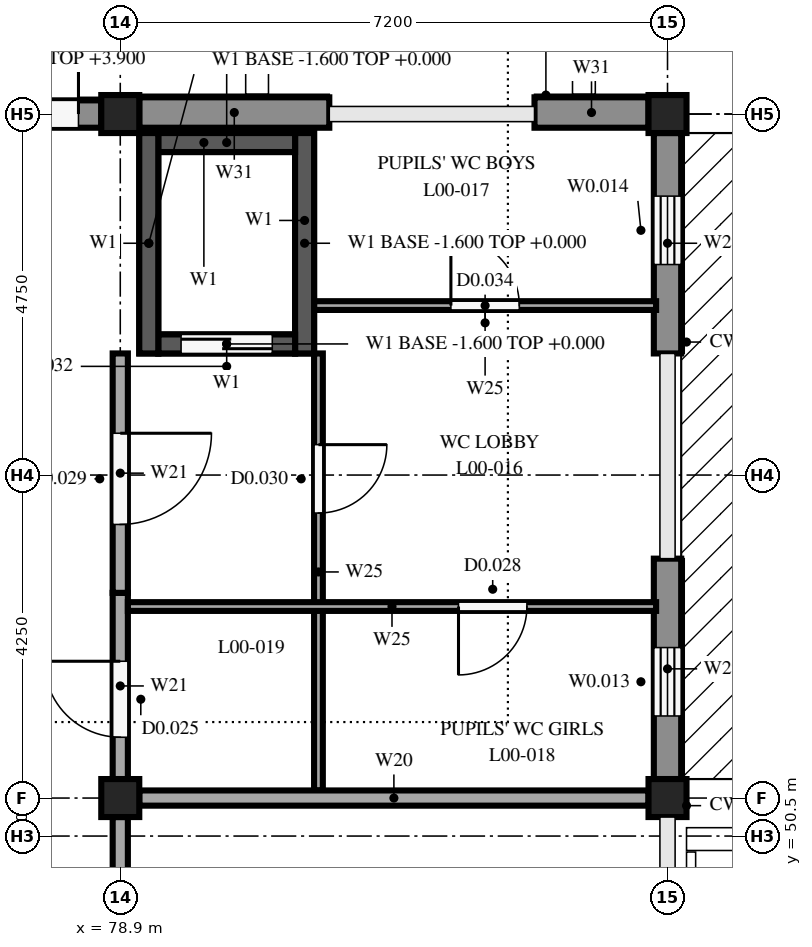
"""IFC4 building model, lengths in metres.
Left out: names, types, materials, properties, quantities, classifications, styles, units other than length and angle.
Written with IfcOpenShell. Run it as: python <this file> out.ifc"""

import sys

from ifc_helpers import new_model, si_unit, direction, frame, frame_2d, origin, origin_2d, place, context, subcontext, project, spatial, rectangle, extrude, element, fill, save


model = new_model("IFC4")
c1 = context("Model", 3, precision=1e-05, world=origin(), true_north=direction((0.0, 1.0)))
c2 = subcontext(c1, "Body", "Model", "MODEL_VIEW")
j1 = project(units=[si_unit("LENGTHUNIT", "METRE"), si_unit("PLANEANGLEUNIT", "RADIAN")], contexts=[c1])
p1 = place(None, origin())
s1 = spatial("IfcSite", under=j1, at=p1, CompositionType="ELEMENT")
p2 = place(p1, origin())
s2 = spatial("IfcBuilding", under=s1, at=p2, CompositionType="ELEMENT")
p3 = place(p2, origin())
s3 = spatial("IfcBuildingStorey", under=s2, at=p3, CompositionType="ELEMENT", Elevation=0.0)
for number, where, z_axis, x_axis in (
    (1, (78.9, 51.0, 0.0), (0.0, 0.0, 1.0), (1.0, 0.0, 0.0)),
    (2, (78.9, 60.0, 0.0), (0.0, 0.0, 1.0), (1.0, 0.0, 0.0)),
    (3, (86.1, 51.0, 0.0), (0.0, 0.0, 1.0), (1.0, 0.0, 0.0)),
    (4, (86.1, 60.0, 0.0), (0.0, 0.0, 1.0), (1.0, 0.0, 0.0)),
):
    element("IfcColumn", number, at=place(p3, frame(where, z_axis=z_axis, x_axis=x_axis)), inside=s3, PredefinedType="COLUMN", context=c2, shape_type="SweptSolid", body=[
        extrude(rectangle(XDim=0.5, YDim=0.5, at=origin_2d()), origin(), (0.0, 0.0, 1.0), 4.25),
    ])
for number, where, z_axis, x_axis in (
    (5, (79.275, 56.85, 0.0), (0.0, 0.0, 1.0), (0.0, 1.0, 0.0)),
    (6, (81.325, 56.85, 0.0), (0.0, 0.0, 1.0), (0.0, 1.0, 0.0)),
):
    element("IfcWall", number, at=place(p3, frame(where, z_axis=z_axis, x_axis=x_axis)), inside=s3, PredefinedType="SHEAR", context=c2, shape_type="SweptSolid", body=[
        extrude(rectangle(XDim=2.9, YDim=0.25, at=frame_2d((1.45, 0.0))), origin(), (0.0, 0.0, 1.0), 4.25),
    ])
p4 = place(p3, frame((79.4, 56.975, 0.0), z_axis=(0.0, 0.0, 1.0), x_axis=(1.0, 0.0, 0.0)))
e7 = element("IfcWall", 7, at=p4, inside=s3, PredefinedType="SHEAR", context=c2, shape_type="SweptSolid", body=[
    extrude(rectangle(XDim=1.8, YDim=0.25, at=frame_2d((0.9, 0.0))), origin(), (0.0, 0.0, 1.0), 4.25),
])
p5 = place(p4, frame((0.3, 0.0, 0.0)))
e8 = element("IfcOpeningElement", 8, at=p5, cuts=e7, PredefinedType="OPENING", context=c2, shape_type="SweptSolid", body=[
    extrude(rectangle(XDim=1.2, YDim=2.1, at=frame_2d((0.6, 1.05))), frame((0.0, 0.135, 0.0), z_axis=(0.0, -1.0, 0.0), x_axis=(1.0, 0.0, 0.0)), (0.0, 0.0, 1.0), 0.27),
])
p6 = place(p3, frame((79.4, 59.625, 0.0), z_axis=(0.0, 0.0, 1.0), x_axis=(1.0, 0.0, 0.0)))
e9 = element("IfcWall", 9, at=p6, inside=s3, PredefinedType="SHEAR", context=c2, shape_type="SweptSolid", body=[
    extrude(rectangle(XDim=1.8, YDim=0.25, at=frame_2d((0.9, 0.0))), origin(), (0.0, 0.0, 1.0), 4.25),
])
for number, where, z_axis, x_axis in (
    (10, (79.275, 56.85, -1.6), (0.0, 0.0, 1.0), (0.0, 1.0, 0.0)),
    (11, (81.325, 56.85, -1.6), (0.0, 0.0, 1.0), (0.0, 1.0, 0.0)),
):
    element("IfcWall", number, at=place(p3, frame(where, z_axis=z_axis, x_axis=x_axis)), inside=s3, PredefinedType="SHEAR", context=c2, shape_type="SweptSolid", body=[
        extrude(rectangle(XDim=2.9, YDim=0.25, at=frame_2d((1.45, 0.0))), origin(), (0.0, 0.0, 1.0), 1.6),
    ])
for number, where, z_axis, x_axis in (
    (12, (79.4, 56.975, -1.6), (0.0, 0.0, 1.0), (1.0, 0.0, 0.0)),
    (13, (79.4, 59.625, -1.6), (0.0, 0.0, 1.0), (1.0, 0.0, 0.0)),
):
    element("IfcWall", number, at=place(p3, frame(where, z_axis=z_axis, x_axis=x_axis)), inside=s3, PredefinedType="SHEAR", context=c2, shape_type="SweptSolid", body=[
        extrude(rectangle(XDim=1.8, YDim=0.25, at=frame_2d((0.9, 0.0))), origin(), (0.0, 0.0, 1.0), 1.6),
    ])
p7 = place(p3, frame((86.1, 54.15, 0.0), z_axis=(0.0, 0.0, 1.0), x_axis=(0.0, -1.0, 0.0)))
e14 = element("IfcWall", 14, at=p7, inside=s3, PredefinedType="STANDARD", context=c2, shape_type="SweptSolid", body=[
    extrude(rectangle(XDim=2.9, YDim=0.36, at=frame_2d((1.45, 0.0))), origin(), (0.0, 0.0, 1.0), 3.75),
])
p8 = place(p7, frame((1.17, 0.0, 1.6)))
e15 = element("IfcOpeningElement", 15, at=p8, cuts=e14, PredefinedType="OPENING", context=c2, shape_type="SweptSolid", body=[
    extrude(rectangle(XDim=0.9, YDim=1.0, at=frame_2d((0.45, 0.5))), frame((0.0, 0.19, 0.0), z_axis=(0.0, -1.0, 0.0), x_axis=(1.0, 0.0, 0.0)), (0.0, 0.0, 1.0), 0.38),
])
p9 = place(p3, frame((86.1, 59.75, 0.0), z_axis=(0.0, 0.0, 1.0), x_axis=(0.0, -1.0, 0.0)))
e16 = element("IfcWall", 16, at=p9, inside=s3, PredefinedType="STANDARD", context=c2, shape_type="SweptSolid", body=[
    extrude(rectangle(XDim=2.9, YDim=0.36, at=frame_2d((1.45, 0.0))), origin(), (0.0, 0.0, 1.0), 3.75),
])
p10 = place(p9, frame((0.83, 0.0, 1.6)))
e17 = element("IfcOpeningElement", 17, at=p10, cuts=e16, PredefinedType="OPENING", context=c2, shape_type="SweptSolid", body=[
    extrude(rectangle(XDim=0.9, YDim=1.0, at=frame_2d((0.45, 0.5))), frame((0.0, 0.19, 0.0), z_axis=(0.0, -1.0, 0.0), x_axis=(1.0, 0.0, 0.0)), (0.0, 0.0, 1.0), 0.38),
])
p11 = place(p3, frame((76.45, 60.0, 0.0), z_axis=(0.0, 0.0, 1.0), x_axis=(1.0, 0.0, 0.0)))
e18 = element("IfcWall", 18, at=p11, inside=s3, PredefinedType="STANDARD", context=c2, shape_type="SweptSolid", body=[
    extrude(rectangle(XDim=2.2, YDim=0.36, at=frame_2d((1.1, 0.0))), origin(), (0.0, 0.0, 1.0), 3.9),
])
p12 = place(p11, frame((0.3, 0.0, 0.0)))
e19 = element("IfcOpeningElement", 19, at=p12, cuts=e18, PredefinedType="OPENING", context=c2, shape_type="SweptSolid", body=[
    extrude(rectangle(XDim=1.6, YDim=2.1, at=frame_2d((0.8, 1.05))), frame((0.0, 0.19, 0.0), z_axis=(0.0, -1.0, 0.0), x_axis=(1.0, 0.0, 0.0)), (0.0, 0.0, 1.0), 0.38),
])
p13 = place(p3, frame((79.15, 60.02, 0.0), z_axis=(0.0, 0.0, 1.0), x_axis=(1.0, 0.0, 0.0)))
e20 = element("IfcWall", 20, at=p13, inside=s3, PredefinedType="STANDARD", context=c2, shape_type="SweptSolid", body=[
    extrude(rectangle(XDim=2.5, YDim=0.4, at=frame_2d((1.25, 0.0))), origin(), (0.0, 0.0, 1.0), 3.8),
])
p14 = place(p3, frame((84.35, 60.02, 0.0), z_axis=(0.0, 0.0, 1.0), x_axis=(1.0, 0.0, 0.0)))
e21 = element("IfcWall", 21, at=p14, inside=s3, PredefinedType="STANDARD", context=c2, shape_type="SweptSolid", body=[
    extrude(rectangle(XDim=1.5, YDim=0.4, at=frame_2d((0.75, 0.0))), origin(), (0.0, 0.0, 1.0), 3.8),
])
p15 = place(p3, frame((78.9, 51.25, 0.0), z_axis=(0.0, 0.0, 1.0), x_axis=(0.0, 1.0, 0.0)))
e22 = element("IfcWall", 22, at=p15, inside=s3, PredefinedType="PARTITIONING", context=c2, shape_type="SweptSolid", body=[
    extrude(rectangle(XDim=2.45, YDim=0.2, at=frame_2d((1.225, 0.0))), origin(), (0.0, 0.0, 1.0), 3.8),
])
p16 = place(p15, frame((0.55, 0.0, 0.0)))
e23 = element("IfcOpeningElement", 23, at=p16, cuts=e22, PredefinedType="OPENING", context=c2, shape_type="SweptSolid", body=[
    extrude(rectangle(XDim=1.0, YDim=2.1, at=frame_2d((0.5, 1.05))), frame((0.0, 0.11, 0.0), z_axis=(0.0, -1.0, 0.0), x_axis=(1.0, 0.0, 0.0)), (0.0, 0.0, 1.0), 0.22),
])
p17 = place(p3, frame((78.9, 56.85, 0.0), z_axis=(0.0, 0.0, 1.0), x_axis=(0.0, -1.0, 0.0)))
e24 = element("IfcWall", 24, at=p17, inside=s3, PredefinedType="PARTITIONING", context=c2, shape_type="SweptSolid", body=[
    extrude(rectangle(XDim=3.15, YDim=0.2, at=frame_2d((1.575, 0.0))), origin(), (0.0, 0.0, 1.0), 3.8),
])
p18 = place(p17, frame((1.05, 0.0, 0.0)))
e25 = element("IfcOpeningElement", 25, at=p18, cuts=e24, PredefinedType="OPENING", context=c2, shape_type="SweptSolid", body=[
    extrude(rectangle(XDim=1.2, YDim=2.1, at=frame_2d((0.6, 1.05))), frame((0.0, 0.11, 0.0), z_axis=(0.0, -1.0, 0.0), x_axis=(1.0, 0.0, 0.0)), (0.0, 0.0, 1.0), 0.22),
])
p19 = place(p3, frame((79.15, 51.0, 0.0), z_axis=(0.0, 0.0, 1.0), x_axis=(1.0, 0.0, 0.0)))
e26 = element("IfcWall", 26, at=p19, inside=s3, PredefinedType="PARTITIONING", context=c2, shape_type="SweptSolid", body=[
    extrude(rectangle(XDim=6.7, YDim=0.2, at=frame_2d((3.35, 0.0))), origin(), (0.0, 0.0, 1.0), 3.8),
])
p20 = place(p3, frame((81.508, 56.85, 0.0), z_axis=(0.0, 0.0, 1.0), x_axis=(0.0, -1.0, 0.0)))
e27 = element("IfcWall", 27, at=p20, inside=s3, PredefinedType="PARTITIONING", context=c2, shape_type="SweptSolid", body=[
    extrude(rectangle(XDim=5.75, YDim=0.115, at=frame_2d((2.875, 0.0))), origin(), (0.0, 0.0, 1.0), 4.25),
])
p21 = place(p20, frame((1.2, 0.0, 0.0)))
e28 = element("IfcOpeningElement", 28, at=p21, cuts=e27, PredefinedType="OPENING", context=c2, shape_type="SweptSolid", body=[
    extrude(rectangle(XDim=0.9, YDim=2.1, at=frame_2d((0.45, 1.05))), frame((0.0, 0.067, 0.0), z_axis=(0.0, -1.0, 0.0), x_axis=(1.0, 0.0, 0.0)), (0.0, 0.0, 1.0), 0.135),
])
p22 = place(p3, frame((81.45, 57.48, 0.0), z_axis=(0.0, 0.0, 1.0), x_axis=(1.0, 0.0, 0.0)))
e29 = element("IfcWall", 29, at=p22, inside=s3, PredefinedType="PARTITIONING", context=c2, shape_type="SweptSolid", body=[
    extrude(rectangle(XDim=4.5, YDim=0.115, at=frame_2d((2.25, 0.0))), origin(), (0.0, 0.0, 1.0), 4.25),
])
p23 = place(p22, frame((1.8, 0.0, 0.0)))
e30 = element("IfcOpeningElement", 30, at=p23, cuts=e29, PredefinedType="OPENING", context=c2, shape_type="SweptSolid", body=[
    extrude(rectangle(XDim=0.9, YDim=2.1, at=frame_2d((0.45, 1.05))), frame((0.0, 0.067, 0.0), z_axis=(0.0, -1.0, 0.0), x_axis=(1.0, 0.0, 0.0)), (0.0, 0.0, 1.0), 0.135),
])
p24 = place(p3, frame((85.95, 53.52, 0.0), z_axis=(0.0, 0.0, 1.0), x_axis=(-1.0, 0.0, 0.0)))
e31 = element("IfcWall", 31, at=p24, inside=s3, PredefinedType="PARTITIONING", context=c2, shape_type="SweptSolid", body=[
    extrude(rectangle(XDim=6.95, YDim=0.115, at=frame_2d((3.475, 0.0))), origin(), (0.0, 0.0, 1.0), 4.25),
])
p25 = place(p24, frame((1.7, 0.0, 0.0)))
e32 = element("IfcOpeningElement", 32, at=p25, cuts=e31, PredefinedType="OPENING", context=c2, shape_type="SweptSolid", body=[
    extrude(rectangle(XDim=0.9, YDim=2.1, at=frame_2d((0.45, 1.05))), frame((0.0, 0.067, 0.0), z_axis=(0.0, -1.0, 0.0), x_axis=(1.0, 0.0, 0.0)), (0.0, 0.0, 1.0), 0.135),
])
p26 = place(p3, frame((78.9, 50.75, 0.0), z_axis=(0.0, 0.0, 1.0), x_axis=(0.0, -1.0, 0.0)))
e33 = element("IfcWall", 33, at=p26, inside=s3, PredefinedType="PARTITIONING", context=c2, shape_type="SweptSolid", body=[
    extrude(rectangle(XDim=8.5, YDim=0.2, at=frame_2d((4.25, 0.0))), origin(), (0.0, 0.0, 1.0), 3.8),
])
p27 = place(p26, frame((5.85, 0.0, 0.0)))
e34 = element("IfcOpeningElement", 34, at=p27, cuts=e33, PredefinedType="OPENING", context=c2, shape_type="SweptSolid", body=[
    extrude(rectangle(XDim=1.2, YDim=2.1, at=frame_2d((0.6, 1.05))), frame((0.0, 0.11, 0.0), z_axis=(0.0, -1.0, 0.0), x_axis=(1.0, 0.0, 0.0)), (0.0, 0.0, 1.0), 0.22),
])
p28 = place(p26, frame((1.45, 0.0, 0.0)))
e35 = element("IfcOpeningElement", 35, at=p28, cuts=e33, PredefinedType="OPENING", context=c2, shape_type="SweptSolid", body=[
    extrude(rectangle(XDim=1.2, YDim=2.1, at=frame_2d((0.6, 1.05))), frame((0.0, 0.11, 0.0), z_axis=(0.0, -1.0, 0.0), x_axis=(1.0, 0.0, 0.0)), (0.0, 0.0, 1.0), 0.22),
])
p29 = place(p8, origin())
e36 = element("IfcWindow", 36, at=p29, inside=s3, PartitioningType="SINGLE_PANEL", PredefinedType="WINDOW", context=c2, shape_type="SweptSolid", body=[
    extrude(rectangle(XDim=0.9, YDim=1.0, at=frame_2d((0.45, 0.5))), frame((0.0, 0.03, 0.0), z_axis=(0.0, -1.0, 0.0), x_axis=(1.0, 0.0, 0.0)), (0.0, 0.0, 1.0), 0.06),
])
fill(e15, e36)
p30 = place(p10, origin())
e37 = element("IfcWindow", 37, at=p30, inside=s3, PartitioningType="SINGLE_PANEL", PredefinedType="WINDOW", context=c2, shape_type="SweptSolid", body=[
    extrude(rectangle(XDim=0.9, YDim=1.0, at=frame_2d((0.45, 0.5))), frame((0.0, 0.03, 0.0), z_axis=(0.0, -1.0, 0.0), x_axis=(1.0, 0.0, 0.0)), (0.0, 0.0, 1.0), 0.06),
])
fill(e17, e37)
p31 = place(p12, origin())
e38 = element("IfcDoor", 38, at=p31, inside=s3, OperationType="DOUBLE_DOOR_SINGLE_SWING", PredefinedType="DOOR", context=c2, shape_type="SweptSolid", body=[
    extrude(rectangle(XDim=1.6, YDim=2.1, at=frame_2d((0.8, 1.05))), frame((0.0, 0.025, 0.0), z_axis=(0.0, -1.0, 0.0), x_axis=(1.0, 0.0, 0.0)), (0.0, 0.0, 1.0), 0.05),
])
fill(e19, e38)
p32 = place(p16, origin())
e39 = element("IfcDoor", 39, at=p32, inside=s3, OperationType="SINGLE_SWING_RIGHT", PredefinedType="DOOR", context=c2, shape_type="SweptSolid", body=[
    extrude(rectangle(XDim=1.0, YDim=2.1, at=frame_2d((0.5, 1.05))), frame((0.0, 0.025, 0.0), z_axis=(0.0, -1.0, 0.0), x_axis=(1.0, 0.0, 0.0)), (0.0, 0.0, 1.0), 0.05),
])
fill(e23, e39)
p33 = place(p18, origin())
e40 = element("IfcDoor", 40, at=p33, inside=s3, OperationType="SINGLE_SWING_LEFT", PredefinedType="DOOR", context=c2, shape_type="SweptSolid", body=[
    extrude(rectangle(XDim=1.2, YDim=2.1, at=frame_2d((0.6, 1.05))), frame((0.0, 0.025, 0.0), z_axis=(0.0, -1.0, 0.0), x_axis=(1.0, 0.0, 0.0)), (0.0, 0.0, 1.0), 0.05),
])
fill(e25, e40)
p34 = place(p21, origin())
e41 = element("IfcDoor", 41, at=p34, inside=s3, OperationType="SINGLE_SWING_LEFT", PredefinedType="DOOR", context=c2, shape_type="SweptSolid", body=[
    extrude(rectangle(XDim=0.9, YDim=2.1, at=frame_2d((0.45, 1.05))), frame((0.0, 0.025, 0.0), z_axis=(0.0, -1.0, 0.0), x_axis=(1.0, 0.0, 0.0)), (0.0, 0.0, 1.0), 0.05),
])
fill(e28, e41)
p35 = place(p23, origin())
e42 = element("IfcDoor", 42, at=p35, inside=s3, OperationType="SINGLE_SWING_LEFT", PredefinedType="DOOR", context=c2, shape_type="SweptSolid", body=[
    extrude(rectangle(XDim=0.9, YDim=2.1, at=frame_2d((0.45, 1.05))), frame((0.0, 0.025, 0.0), z_axis=(0.0, -1.0, 0.0), x_axis=(1.0, 0.0, 0.0)), (0.0, 0.0, 1.0), 0.05),
])
fill(e30, e42)
p36 = place(p25, origin())
e43 = element("IfcDoor", 43, at=p36, inside=s3, OperationType="SINGLE_SWING_RIGHT", PredefinedType="DOOR", context=c2, shape_type="SweptSolid", body=[
    extrude(rectangle(XDim=0.9, YDim=2.1, at=frame_2d((0.45, 1.05))), frame((0.0, 0.025, 0.0), z_axis=(0.0, -1.0, 0.0), x_axis=(1.0, 0.0, 0.0)), (0.0, 0.0, 1.0), 0.05),
])
fill(e32, e43)
p37 = place(p5, origin())
e44 = element("IfcDoor", 44, at=p37, inside=s3, OperationType="SLIDING_TO_LEFT", PredefinedType="DOOR", context=c2, shape_type="SweptSolid", body=[
    extrude(rectangle(XDim=1.2, YDim=2.1, at=frame_2d((0.6, 1.05))), frame((0.0, 0.025, 0.0), z_axis=(0.0, -1.0, 0.0), x_axis=(1.0, 0.0, 0.0)), (0.0, 0.0, 1.0), 0.05),
])
fill(e8, e44)
save(model, sys.argv[1])
